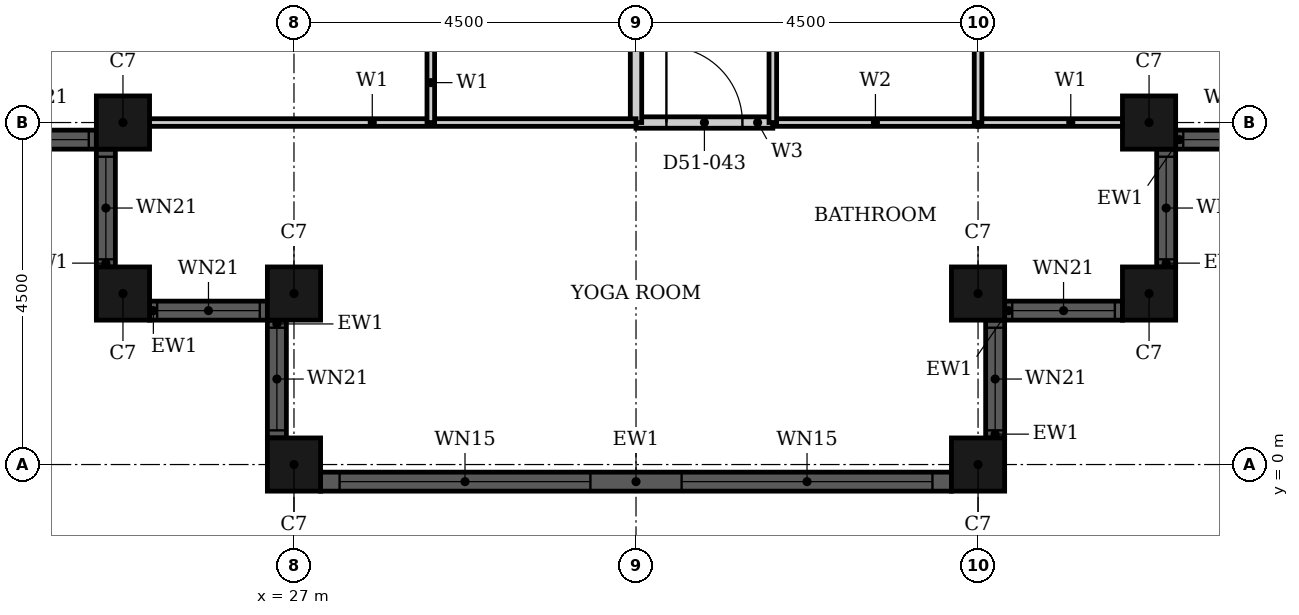
"""IFC4 building model, lengths in metres.
Left out: names, types, materials, properties, quantities, classifications, styles, units other than length and angle.
Written with IfcOpenShell. Run it as: python <this file> out.ifc"""

import sys

from ifc_helpers import new_model, si_unit, direction, frame, frame_2d, origin, origin_2d, place, context, subcontext, project, spatial, rectangle, hollow_rectangle, extrude, element, fill, save


model = new_model("IFC4")
c1 = context("Model", 3, precision=1e-05, world=origin(), true_north=direction((0.0, 1.0)))
c2 = subcontext(c1, "Body", "Model", "MODEL_VIEW")
j1 = project(units=[si_unit("LENGTHUNIT", "METRE"), si_unit("PLANEANGLEUNIT", "RADIAN")], contexts=[c1])
p1 = place(None, origin())
s1 = spatial("IfcSite", under=j1, at=p1, CompositionType="ELEMENT")
p2 = place(p1, origin())
s2 = spatial("IfcBuilding", under=s1, at=p2, CompositionType="ELEMENT")
p3 = place(p2, frame((0.0, 0.0, 203.5)))
s3 = spatial("IfcBuildingStorey", under=s2, at=p3, CompositionType="ELEMENT", Elevation=203.5)
for number, where, z_axis, x_axis in (
    (1, (24.75, 4.5, 0.0), (0.0, 0.0, 1.0), (1.0, 0.0, 0.0)),
    (2, (24.75, 2.25, 0.0), (0.0, 0.0, 1.0), (1.0, 0.0, 0.0)),
    (3, (27.0, 2.25, 0.0), (0.0, 0.0, 1.0), (1.0, 0.0, 0.0)),
    (4, (27.0, 0.0, 0.0), (0.0, 0.0, 1.0), (1.0, 0.0, 0.0)),
    (5, (36.0, 0.0, 0.0), (0.0, 0.0, 1.0), (1.0, 0.0, 0.0)),
    (6, (36.0, 2.25, 0.0), (0.0, 0.0, 1.0), (1.0, 0.0, 0.0)),
    (7, (38.25, 2.25, 0.0), (0.0, 0.0, 1.0), (1.0, 0.0, 0.0)),
    (8, (38.25, 4.5, 0.0), (0.0, 0.0, 1.0), (1.0, 0.0, 0.0)),
):
    element("IfcColumn", number, at=place(p3, frame(where, z_axis=z_axis, x_axis=x_axis)), inside=s3, PredefinedType="COLUMN", context=c2, shape_type="SweptSolid", body=[
        extrude(hollow_rectangle(XDim=0.7, YDim=0.7, WallThickness=0.022, at=origin_2d()), origin(), (0.0, 0.0, 1.0), 3.7),
    ])
p4 = place(p3, frame((22.85, 4.275, 0.0), z_axis=(0.0, 0.0, 1.0), x_axis=(1.0, 0.0, 0.0)))
e9 = element("IfcWall", 9, at=p4, inside=s3, PredefinedType="SOLIDWALL", context=c2, shape_type="SweptSolid", body=[
    extrude(rectangle(XDim=1.55, YDim=0.25, at=frame_2d((0.775, 0.0))), origin(), (0.0, 0.0, 1.0), 3.7),
])
p5 = place(p4, frame((0.1, 0.0, 0.9)))
e10 = element("IfcOpeningElement", 10, at=p5, cuts=e9, PredefinedType="OPENING", context=c2, shape_type="SweptSolid", body=[
    extrude(rectangle(XDim=1.35, YDim=1.85, at=frame_2d((0.675, 0.925))), frame((0.0, 0.135, 0.0), z_axis=(0.0, -1.0, 0.0), x_axis=(1.0, 0.0, 0.0)), (0.0, 0.0, 1.0), 0.27),
])
p6 = place(p3, frame((24.525, 4.15, 0.0), z_axis=(0.0, 0.0, 1.0), x_axis=(0.0, -1.0, 0.0)))
e11 = element("IfcWall", 11, at=p6, inside=s3, PredefinedType="SOLIDWALL", context=c2, shape_type="SweptSolid", body=[
    extrude(rectangle(XDim=1.55, YDim=0.25, at=frame_2d((0.775, 0.0))), origin(), (0.0, 0.0, 1.0), 3.7),
])
p7 = place(p6, frame((0.1, 0.0, 0.9)))
e12 = element("IfcOpeningElement", 12, at=p7, cuts=e11, PredefinedType="OPENING", context=c2, shape_type="SweptSolid", body=[
    extrude(rectangle(XDim=1.35, YDim=1.85, at=frame_2d((0.675, 0.925))), frame((0.0, 0.135, 0.0), z_axis=(0.0, -1.0, 0.0), x_axis=(1.0, 0.0, 0.0)), (0.0, 0.0, 1.0), 0.27),
])
p8 = place(p3, frame((25.1, 2.025, 0.0), z_axis=(0.0, 0.0, 1.0), x_axis=(1.0, 0.0, 0.0)))
e13 = element("IfcWall", 13, at=p8, inside=s3, PredefinedType="SOLIDWALL", context=c2, shape_type="SweptSolid", body=[
    extrude(rectangle(XDim=1.55, YDim=0.25, at=frame_2d((0.775, 0.0))), origin(), (0.0, 0.0, 1.0), 3.7),
])
p9 = place(p8, frame((0.1, 0.0, 0.9)))
e14 = element("IfcOpeningElement", 14, at=p9, cuts=e13, PredefinedType="OPENING", context=c2, shape_type="SweptSolid", body=[
    extrude(rectangle(XDim=1.35, YDim=1.85, at=frame_2d((0.675, 0.925))), frame((0.0, 0.135, 0.0), z_axis=(0.0, -1.0, 0.0), x_axis=(1.0, 0.0, 0.0)), (0.0, 0.0, 1.0), 0.27),
])
p10 = place(p3, frame((26.775, 1.9, 0.0), z_axis=(0.0, 0.0, 1.0), x_axis=(0.0, -1.0, 0.0)))
e15 = element("IfcWall", 15, at=p10, inside=s3, PredefinedType="SOLIDWALL", context=c2, shape_type="SweptSolid", body=[
    extrude(rectangle(XDim=1.55, YDim=0.25, at=frame_2d((0.775, 0.0))), origin(), (0.0, 0.0, 1.0), 3.7),
])
p11 = place(p10, frame((0.1, 0.0, 0.9)))
e16 = element("IfcOpeningElement", 16, at=p11, cuts=e15, PredefinedType="OPENING", context=c2, shape_type="SweptSolid", body=[
    extrude(rectangle(XDim=1.35, YDim=1.85, at=frame_2d((0.675, 0.925))), frame((0.0, 0.135, 0.0), z_axis=(0.0, -1.0, 0.0), x_axis=(1.0, 0.0, 0.0)), (0.0, 0.0, 1.0), 0.27),
])
p12 = place(p3, frame((27.35, -0.225, 0.0), z_axis=(0.0, 0.0, 1.0), x_axis=(1.0, 0.0, 0.0)))
e17 = element("IfcWall", 17, at=p12, inside=s3, PredefinedType="SOLIDWALL", context=c2, shape_type="SweptSolid", body=[
    extrude(rectangle(XDim=8.3, YDim=0.25, at=frame_2d((4.15, 0.0))), origin(), (0.0, 0.0, 1.0), 3.7),
])
p13 = place(p12, frame((0.25, 0.0, 0.45)))
e18 = element("IfcOpeningElement", 18, at=p13, cuts=e17, PredefinedType="OPENING", context=c2, shape_type="SweptSolid", body=[
    extrude(rectangle(XDim=3.3, YDim=2.3, at=frame_2d((1.65, 1.15))), frame((0.0, 0.135, 0.0), z_axis=(0.0, -1.0, 0.0), x_axis=(1.0, 0.0, 0.0)), (0.0, 0.0, 1.0), 0.27),
])
p14 = place(p12, frame((4.75, 0.0, 0.45)))
e19 = element("IfcOpeningElement", 19, at=p14, cuts=e17, PredefinedType="OPENING", context=c2, shape_type="SweptSolid", body=[
    extrude(rectangle(XDim=3.3, YDim=2.3, at=frame_2d((1.65, 1.15))), frame((0.0, 0.135, 0.0), z_axis=(0.0, -1.0, 0.0), x_axis=(1.0, 0.0, 0.0)), (0.0, 0.0, 1.0), 0.27),
])
p15 = place(p3, frame((36.225, 0.35, 0.0), z_axis=(0.0, 0.0, 1.0), x_axis=(0.0, 1.0, 0.0)))
e20 = element("IfcWall", 20, at=p15, inside=s3, PredefinedType="SOLIDWALL", context=c2, shape_type="SweptSolid", body=[
    extrude(rectangle(XDim=1.55, YDim=0.25, at=frame_2d((0.775, 0.0))), origin(), (0.0, 0.0, 1.0), 3.7),
])
p16 = place(p15, frame((0.1, 0.0, 0.9)))
e21 = element("IfcOpeningElement", 21, at=p16, cuts=e20, PredefinedType="OPENING", context=c2, shape_type="SweptSolid", body=[
    extrude(rectangle(XDim=1.35, YDim=1.85, at=frame_2d((0.675, 0.925))), frame((0.0, 0.135, 0.0), z_axis=(0.0, -1.0, 0.0), x_axis=(1.0, 0.0, 0.0)), (0.0, 0.0, 1.0), 0.27),
])
p17 = place(p3, frame((36.35, 2.025, 0.0), z_axis=(0.0, 0.0, 1.0), x_axis=(1.0, 0.0, 0.0)))
e22 = element("IfcWall", 22, at=p17, inside=s3, PredefinedType="SOLIDWALL", context=c2, shape_type="SweptSolid", body=[
    extrude(rectangle(XDim=1.55, YDim=0.25, at=frame_2d((0.775, 0.0))), origin(), (0.0, 0.0, 1.0), 3.7),
])
p18 = place(p17, frame((0.1, 0.0, 0.9)))
e23 = element("IfcOpeningElement", 23, at=p18, cuts=e22, PredefinedType="OPENING", context=c2, shape_type="SweptSolid", body=[
    extrude(rectangle(XDim=1.35, YDim=1.85, at=frame_2d((0.675, 0.925))), frame((0.0, 0.135, 0.0), z_axis=(0.0, -1.0, 0.0), x_axis=(1.0, 0.0, 0.0)), (0.0, 0.0, 1.0), 0.27),
])
p19 = place(p3, frame((38.475, 2.6, 0.0), z_axis=(0.0, 0.0, 1.0), x_axis=(0.0, 1.0, 0.0)))
e24 = element("IfcWall", 24, at=p19, inside=s3, PredefinedType="SOLIDWALL", context=c2, shape_type="SweptSolid", body=[
    extrude(rectangle(XDim=1.55, YDim=0.25, at=frame_2d((0.775, 0.0))), origin(), (0.0, 0.0, 1.0), 3.7),
])
p20 = place(p19, frame((0.1, 0.0, 0.9)))
e25 = element("IfcOpeningElement", 25, at=p20, cuts=e24, PredefinedType="OPENING", context=c2, shape_type="SweptSolid", body=[
    extrude(rectangle(XDim=1.35, YDim=1.85, at=frame_2d((0.675, 0.925))), frame((0.0, 0.135, 0.0), z_axis=(0.0, -1.0, 0.0), x_axis=(1.0, 0.0, 0.0)), (0.0, 0.0, 1.0), 0.27),
])
p21 = place(p3, frame((38.6, 4.275, 0.0), z_axis=(0.0, 0.0, 1.0), x_axis=(1.0, 0.0, 0.0)))
e26 = element("IfcWall", 26, at=p21, inside=s3, PredefinedType="SOLIDWALL", context=c2, shape_type="SweptSolid", body=[
    extrude(rectangle(XDim=1.55, YDim=0.25, at=frame_2d((0.775, 0.0))), origin(), (0.0, 0.0, 1.0), 3.7),
])
p22 = place(p21, frame((0.1, 0.0, 0.9)))
e27 = element("IfcOpeningElement", 27, at=p22, cuts=e26, PredefinedType="OPENING", context=c2, shape_type="SweptSolid", body=[
    extrude(rectangle(XDim=1.35, YDim=1.85, at=frame_2d((0.675, 0.925))), frame((0.0, 0.135, 0.0), z_axis=(0.0, -1.0, 0.0), x_axis=(1.0, 0.0, 0.0)), (0.0, 0.0, 1.0), 0.27),
])
p23 = place(p3, frame((31.5, 4.5, 0.0), z_axis=(0.0, 0.0, 1.0), x_axis=(1.0, 0.0, 0.0)))
e28 = element("IfcWall", 28, at=p23, inside=s3, PredefinedType="PARTITIONING", context=c2, shape_type="SweptSolid", body=[
    extrude(rectangle(XDim=1.8, YDim=0.15, at=frame_2d((0.9, 0.0))), origin(), (0.0, 0.0, 1.0), 3.4),
])
p24 = place(p23, frame((0.4, 0.0, 0.0)))
e29 = element("IfcOpeningElement", 29, at=p24, cuts=e28, PredefinedType="OPENING", context=c2, shape_type="SweptSolid", body=[
    extrude(rectangle(XDim=1.0, YDim=2.1, at=frame_2d((0.5, 1.05))), frame((0.0, 0.085, 0.0), z_axis=(0.0, -1.0, 0.0), x_axis=(1.0, 0.0, 0.0)), (0.0, 0.0, 1.0), 0.17),
])
p25 = place(p3, frame((31.5, 4.5, 0.0), z_axis=(0.0, 0.0, 1.0), x_axis=(0.0, 1.0, 0.0)))
e30 = element("IfcWall", 30, at=p25, inside=s3, PredefinedType="PARTITIONING", context=c2, shape_type="SweptSolid", body=[
    extrude(rectangle(XDim=6.6, YDim=0.15, at=frame_2d((3.3, 0.0))), origin(), (0.0, 0.0, 1.0), 2.68),
])
p26 = place(p25, frame((4.3, 0.0, 0.0)))
e31 = element("IfcOpeningElement", 31, at=p26, cuts=e30, PredefinedType="OPENING", context=c2, shape_type="SweptSolid", body=[
    extrude(rectangle(XDim=1.0, YDim=2.2, at=frame_2d((0.5, 1.1))), frame((0.0, 0.085, 0.0), z_axis=(0.0, -1.0, 0.0), x_axis=(1.0, 0.0, 0.0)), (0.0, 0.0, 1.0), 0.17),
])
p27 = place(p3, frame((36.0, 4.5, 0.0), z_axis=(0.0, 0.0, 1.0), x_axis=(1.0, 0.0, 0.0)))
e32 = element("IfcWall", 32, at=p27, inside=s3, PredefinedType="PARTITIONING", context=c2, shape_type="SweptSolid", body=[
    extrude(rectangle(XDim=2.44, YDim=0.1, at=frame_2d((1.22, 0.0))), origin(), (0.0, 0.0, 1.0), 3.4),
])
p28 = place(p3, frame((24.56, 4.5, 0.0), z_axis=(0.0, 0.0, 1.0), x_axis=(1.0, 0.0, 0.0)))
e33 = element("IfcWall", 33, at=p28, inside=s3, PredefinedType="PARTITIONING", context=c2, shape_type="SweptSolid", body=[
    extrude(rectangle(XDim=6.94, YDim=0.1, at=frame_2d((3.47, 0.0))), origin(), (0.0, 0.0, 1.0), 3.4),
])
p29 = place(p3, frame((28.8, 4.5, 0.0), z_axis=(0.0, 0.0, 1.0), x_axis=(0.0, 1.0, 0.0)))
e34 = element("IfcWall", 34, at=p29, inside=s3, PredefinedType="PARTITIONING", context=c2, shape_type="SweptSolid", body=[
    extrude(rectangle(XDim=3.0, YDim=0.1, at=frame_2d((1.5, 0.0))), origin(), (0.0, 0.0, 1.0), 3.4),
])
p30 = place(p29, frame((1.05, 0.0, 0.0)))
e35 = element("IfcOpeningElement", 35, at=p30, cuts=e34, PredefinedType="OPENING", context=c2, shape_type="SweptSolid", body=[
    extrude(rectangle(XDim=0.9, YDim=2.1, at=frame_2d((0.45, 1.05))), frame((0.0, 0.06, 0.0), z_axis=(0.0, -1.0, 0.0), x_axis=(1.0, 0.0, 0.0)), (0.0, 0.0, 1.0), 0.12),
])
p31 = place(p3, frame((33.3, 4.5, 0.0), z_axis=(0.0, 0.0, 1.0), x_axis=(1.0, 0.0, 0.0)))
e36 = element("IfcWall", 36, at=p31, inside=s3, PredefinedType="PARTITIONING", context=c2, shape_type="SweptSolid", body=[
    extrude(rectangle(XDim=2.7, YDim=0.1, at=frame_2d((1.35, 0.0))), origin(), (0.0, 0.0, 1.0), 3.4),
])
p32 = place(p3, frame((33.3, 4.5, 0.0), z_axis=(0.0, 0.0, 1.0), x_axis=(0.0, 1.0, 0.0)))
e37 = element("IfcWall", 37, at=p32, inside=s3, PredefinedType="PARTITIONING", context=c2, shape_type="SweptSolid", body=[
    extrude(rectangle(XDim=2.4, YDim=0.1, at=frame_2d((1.2, 0.0))), origin(), (0.0, 0.0, 1.0), 3.4),
])
p33 = place(p3, frame((36.0, 4.5, 0.0), z_axis=(0.0, 0.0, 1.0), x_axis=(0.0, 1.0, 0.0)))
e38 = element("IfcWall", 38, at=p33, inside=s3, PredefinedType="PARTITIONING", context=c2, shape_type="SweptSolid", body=[
    extrude(rectangle(XDim=2.4, YDim=0.1, at=frame_2d((1.2, 0.0))), origin(), (0.0, 0.0, 1.0), 2.68),
])
p34 = place(p5, origin())
e39 = element("IfcWindow", 39, at=p34, inside=s3, PartitioningType="SINGLE_PANEL", PredefinedType="WINDOW", context=c2, shape_type="SweptSolid", body=[
    extrude(rectangle(XDim=1.35, YDim=1.85, at=frame_2d((0.675, 0.925))), frame((0.0, 0.03, 0.0), z_axis=(0.0, -1.0, 0.0), x_axis=(1.0, 0.0, 0.0)), (0.0, 0.0, 1.0), 0.06),
])
fill(e10, e39)
p35 = place(p7, origin())
e40 = element("IfcWindow", 40, at=p35, inside=s3, PartitioningType="SINGLE_PANEL", PredefinedType="WINDOW", context=c2, shape_type="SweptSolid", body=[
    extrude(rectangle(XDim=1.35, YDim=1.85, at=frame_2d((0.675, 0.925))), frame((0.0, 0.03, 0.0), z_axis=(0.0, -1.0, 0.0), x_axis=(1.0, 0.0, 0.0)), (0.0, 0.0, 1.0), 0.06),
])
fill(e12, e40)
p36 = place(p9, origin())
e41 = element("IfcWindow", 41, at=p36, inside=s3, PartitioningType="SINGLE_PANEL", PredefinedType="WINDOW", context=c2, shape_type="SweptSolid", body=[
    extrude(rectangle(XDim=1.35, YDim=1.85, at=frame_2d((0.675, 0.925))), frame((0.0, 0.03, 0.0), z_axis=(0.0, -1.0, 0.0), x_axis=(1.0, 0.0, 0.0)), (0.0, 0.0, 1.0), 0.06),
])
fill(e14, e41)
p37 = place(p11, origin())
e42 = element("IfcWindow", 42, at=p37, inside=s3, PartitioningType="SINGLE_PANEL", PredefinedType="WINDOW", context=c2, shape_type="SweptSolid", body=[
    extrude(rectangle(XDim=1.35, YDim=1.85, at=frame_2d((0.675, 0.925))), frame((0.0, 0.03, 0.0), z_axis=(0.0, -1.0, 0.0), x_axis=(1.0, 0.0, 0.0)), (0.0, 0.0, 1.0), 0.06),
])
fill(e16, e42)
p38 = place(p13, origin())
e43 = element("IfcWindow", 43, at=p38, inside=s3, PartitioningType="SINGLE_PANEL", PredefinedType="WINDOW", context=c2, shape_type="SweptSolid", body=[
    extrude(rectangle(XDim=3.3, YDim=2.3, at=frame_2d((1.65, 1.15))), frame((0.0, 0.03, 0.0), z_axis=(0.0, -1.0, 0.0), x_axis=(1.0, 0.0, 0.0)), (0.0, 0.0, 1.0), 0.06),
])
fill(e18, e43)
p39 = place(p14, origin())
e44 = element("IfcWindow", 44, at=p39, inside=s3, PartitioningType="SINGLE_PANEL", PredefinedType="WINDOW", context=c2, shape_type="SweptSolid", body=[
    extrude(rectangle(XDim=3.3, YDim=2.3, at=frame_2d((1.65, 1.15))), frame((0.0, 0.03, 0.0), z_axis=(0.0, -1.0, 0.0), x_axis=(1.0, 0.0, 0.0)), (0.0, 0.0, 1.0), 0.06),
])
fill(e19, e44)
p40 = place(p16, origin())
e45 = element("IfcWindow", 45, at=p40, inside=s3, PartitioningType="SINGLE_PANEL", PredefinedType="WINDOW", context=c2, shape_type="SweptSolid", body=[
    extrude(rectangle(XDim=1.35, YDim=1.85, at=frame_2d((0.675, 0.925))), frame((0.0, 0.03, 0.0), z_axis=(0.0, -1.0, 0.0), x_axis=(1.0, 0.0, 0.0)), (0.0, 0.0, 1.0), 0.06),
])
fill(e21, e45)
p41 = place(p18, origin())
e46 = element("IfcWindow", 46, at=p41, inside=s3, PartitioningType="SINGLE_PANEL", PredefinedType="WINDOW", context=c2, shape_type="SweptSolid", body=[
    extrude(rectangle(XDim=1.35, YDim=1.85, at=frame_2d((0.675, 0.925))), frame((0.0, 0.03, 0.0), z_axis=(0.0, -1.0, 0.0), x_axis=(1.0, 0.0, 0.0)), (0.0, 0.0, 1.0), 0.06),
])
fill(e23, e46)
p42 = place(p20, origin())
e47 = element("IfcWindow", 47, at=p42, inside=s3, PartitioningType="SINGLE_PANEL", PredefinedType="WINDOW", context=c2, shape_type="SweptSolid", body=[
    extrude(rectangle(XDim=1.35, YDim=1.85, at=frame_2d((0.675, 0.925))), frame((0.0, 0.03, 0.0), z_axis=(0.0, -1.0, 0.0), x_axis=(1.0, 0.0, 0.0)), (0.0, 0.0, 1.0), 0.06),
])
fill(e25, e47)
p43 = place(p22, origin())
e48 = element("IfcWindow", 48, at=p43, inside=s3, PartitioningType="SINGLE_PANEL", PredefinedType="WINDOW", context=c2, shape_type="SweptSolid", body=[
    extrude(rectangle(XDim=1.35, YDim=1.85, at=frame_2d((0.675, 0.925))), frame((0.0, 0.03, 0.0), z_axis=(0.0, -1.0, 0.0), x_axis=(1.0, 0.0, 0.0)), (0.0, 0.0, 1.0), 0.06),
])
fill(e27, e48)
p44 = place(p24, origin())
e49 = element("IfcDoor", 49, at=p44, inside=s3, OperationType="SINGLE_SWING_LEFT", PredefinedType="DOOR", context=c2, shape_type="SweptSolid", body=[
    extrude(rectangle(XDim=1.0, YDim=2.1, at=frame_2d((0.5, 1.05))), frame((0.0, 0.025, 0.0), z_axis=(0.0, -1.0, 0.0), x_axis=(1.0, 0.0, 0.0)), (0.0, 0.0, 1.0), 0.05),
])
fill(e29, e49)
save(model, sys.argv[1])
